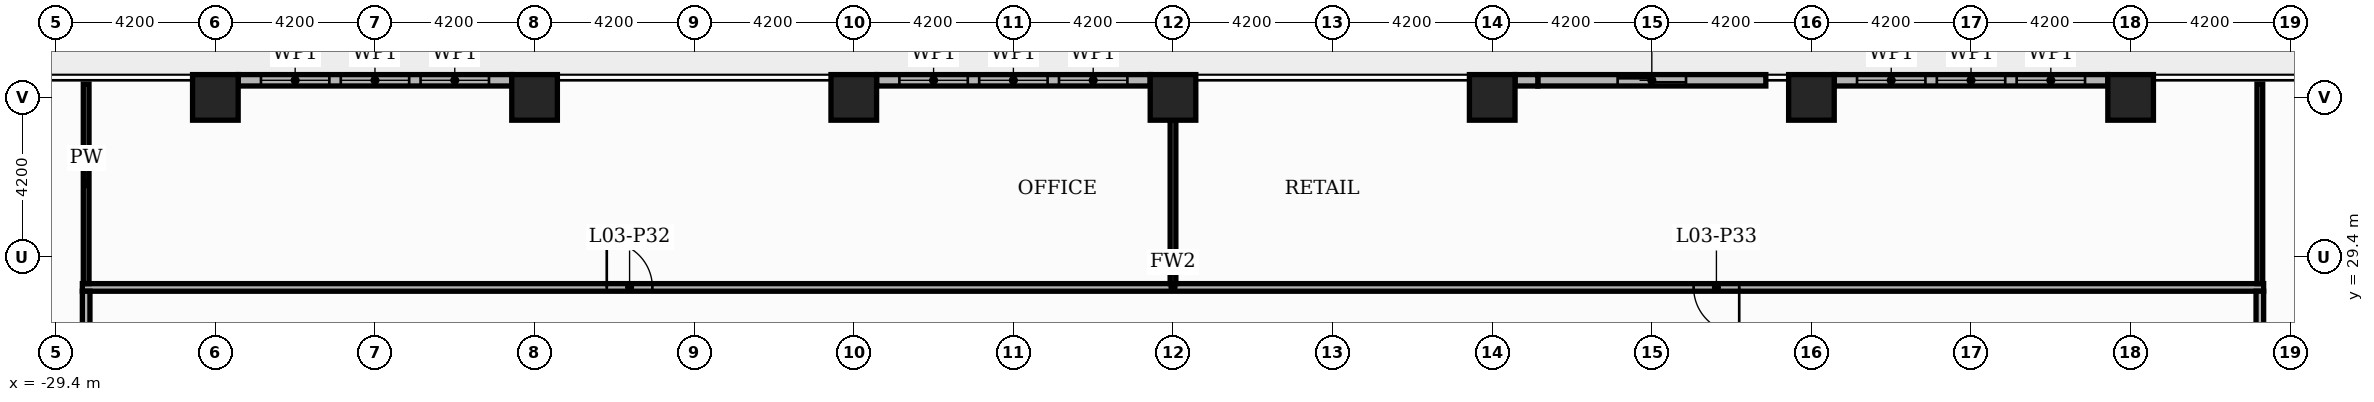
"""IFC4 building model, lengths in metres.
Left out: names, types, materials, properties, quantities, classifications, styles, units other than length and angle.
Written with IfcOpenShell. Run it as: python <this file> out.ifc"""

import sys

from ifc_helpers import new_model, si_unit, direction, frame, frame_2d, origin, origin_2d, place, context, subcontext, project, spatial, rectangle, extrude, element, fill, save


model = new_model("IFC4")
c1 = context("Model", 3, precision=1e-05, world=origin(), true_north=direction((0.0, 1.0)))
c2 = subcontext(c1, "Body", "Model", "MODEL_VIEW")
j1 = project(units=[si_unit("LENGTHUNIT", "METRE"), si_unit("PLANEANGLEUNIT", "RADIAN")], contexts=[c1])
p1 = place(None, origin())
s1 = spatial("IfcSite", under=j1, at=p1, CompositionType="ELEMENT")
p2 = place(p1, origin())
s2 = spatial("IfcBuilding", under=s1, at=p2, CompositionType="ELEMENT")
p3 = place(p2, frame((0.0, 0.0, 16.8)))
s3 = spatial("IfcBuildingStorey", under=s2, at=p3, CompositionType="ELEMENT", Elevation=16.8)
for number, where, z_axis, x_axis in (
    (1, (0.0, 33.6, 0.0), (0.0, 0.0, 1.0), (1.0, 0.0, 0.0)),
    (2, (8.4, 33.6, 0.0), (0.0, 0.0, 1.0), (1.0, 0.0, 0.0)),
    (3, (16.8, 33.6, 0.0), (0.0, 0.0, 1.0), (1.0, 0.0, 0.0)),
    (4, (25.2, 33.6, 0.0), (0.0, 0.0, 1.0), (1.0, 0.0, 0.0)),
    (5, (-8.4, 33.6, 0.0), (0.0, 0.0, 1.0), (1.0, 0.0, 0.0)),
    (6, (-16.8, 33.6, 0.0), (0.0, 0.0, 1.0), (1.0, 0.0, 0.0)),
    (7, (-25.2, 33.6, 0.0), (0.0, 0.0, 1.0), (1.0, 0.0, 0.0)),
):
    element("IfcColumn", number, at=place(p3, frame(where, z_axis=z_axis, x_axis=x_axis)), inside=s3, PredefinedType="COLUMN", context=c2, shape_type="SweptSolid", body=[
        extrude(rectangle(XDim=1.2, YDim=1.2, at=origin_2d()), origin(), (0.0, 0.0, 1.0), 5.4),
    ])
p4 = place(p3, frame((24.6, 34.05, 0.0), z_axis=(0.0, 0.0, 1.0), x_axis=(-1.0, 0.0, 0.0)))
e8 = element("IfcWall", 8, at=p4, inside=s3, PredefinedType="STANDARD", context=c2, shape_type="SweptSolid", body=[
    extrude(rectangle(XDim=7.2, YDim=0.3, at=frame_2d((3.6, 0.0))), origin(), (0.0, 0.0, 1.0), 4.98),
])
p5 = place(p4, frame((0.6, 0.0, 0.6)))
e9 = element("IfcOpeningElement", 9, at=p5, cuts=e8, PredefinedType="OPENING", context=c2, shape_type="SweptSolid", body=[
    extrude(rectangle(XDim=1.8, YDim=3.0, at=frame_2d((0.9, 1.5))), frame((0.0, 0.16, 0.0), z_axis=(0.0, -1.0, 0.0), x_axis=(1.0, 0.0, 0.0)), (0.0, 0.0, 1.0), 0.32),
])
p6 = place(p4, frame((2.7, 0.0, 0.6)))
e10 = element("IfcOpeningElement", 10, at=p6, cuts=e8, PredefinedType="OPENING", context=c2, shape_type="SweptSolid", body=[
    extrude(rectangle(XDim=1.8, YDim=3.0, at=frame_2d((0.9, 1.5))), frame((0.0, 0.16, 0.0), z_axis=(0.0, -1.0, 0.0), x_axis=(1.0, 0.0, 0.0)), (0.0, 0.0, 1.0), 0.32),
])
p7 = place(p4, frame((4.8, 0.0, 0.6)))
e11 = element("IfcOpeningElement", 11, at=p7, cuts=e8, PredefinedType="OPENING", context=c2, shape_type="SweptSolid", body=[
    extrude(rectangle(XDim=1.8, YDim=3.0, at=frame_2d((0.9, 1.5))), frame((0.0, 0.16, 0.0), z_axis=(0.0, -1.0, 0.0), x_axis=(1.0, 0.0, 0.0)), (0.0, 0.0, 1.0), 0.32),
])
p8 = place(p3, frame((15.6, 34.05, 0.0), z_axis=(0.0, 0.0, 1.0), x_axis=(-1.0, 0.0, 0.0)))
e12 = element("IfcWall", 12, at=p8, inside=s3, PredefinedType="STANDARD", context=c2, shape_type="SweptSolid", body=[
    extrude(rectangle(XDim=6.0, YDim=0.3, at=frame_2d((3.0, 0.0))), origin(), (0.0, 0.0, 1.0), 4.98),
])
p9 = place(p8, frame((2.1, 0.0, 0.0)))
e13 = element("IfcOpeningElement", 13, at=p9, cuts=e12, PredefinedType="OPENING", context=c2, shape_type="SweptSolid", body=[
    extrude(rectangle(XDim=1.8, YDim=2.4, at=frame_2d((0.9, 1.2))), frame((0.0, 0.16, 0.0), z_axis=(0.0, -1.0, 0.0), x_axis=(1.0, 0.0, 0.0)), (0.0, 0.0, 1.0), 0.32),
])
p10 = place(p3, frame((9.6, 34.05, 0.0), z_axis=(0.0, 0.0, 1.0), x_axis=(-1.0, 0.0, 0.0)))
e14 = element("IfcWall", 14, at=p10, inside=s3, PredefinedType="STANDARD", context=c2, shape_type="SweptSolid", body=[
    extrude(rectangle(XDim=0.6, YDim=0.3, at=frame_2d((0.3, 0.0))), origin(), (0.0, 0.0, 1.0), 4.98),
])
p11 = place(p3, frame((-0.6, 34.05, 0.0), z_axis=(0.0, 0.0, 1.0), x_axis=(-1.0, 0.0, 0.0)))
e15 = element("IfcWall", 15, at=p11, inside=s3, PredefinedType="STANDARD", context=c2, shape_type="SweptSolid", body=[
    extrude(rectangle(XDim=7.2, YDim=0.3, at=frame_2d((3.6, 0.0))), origin(), (0.0, 0.0, 1.0), 4.98),
])
p12 = place(p11, frame((0.6, 0.0, 0.6)))
e16 = element("IfcOpeningElement", 16, at=p12, cuts=e15, PredefinedType="OPENING", context=c2, shape_type="SweptSolid", body=[
    extrude(rectangle(XDim=1.8, YDim=3.0, at=frame_2d((0.9, 1.5))), frame((0.0, 0.16, 0.0), z_axis=(0.0, -1.0, 0.0), x_axis=(1.0, 0.0, 0.0)), (0.0, 0.0, 1.0), 0.32),
])
p13 = place(p11, frame((2.7, 0.0, 0.6)))
e17 = element("IfcOpeningElement", 17, at=p13, cuts=e15, PredefinedType="OPENING", context=c2, shape_type="SweptSolid", body=[
    extrude(rectangle(XDim=1.8, YDim=3.0, at=frame_2d((0.9, 1.5))), frame((0.0, 0.16, 0.0), z_axis=(0.0, -1.0, 0.0), x_axis=(1.0, 0.0, 0.0)), (0.0, 0.0, 1.0), 0.32),
])
p14 = place(p11, frame((4.8, 0.0, 0.6)))
e18 = element("IfcOpeningElement", 18, at=p14, cuts=e15, PredefinedType="OPENING", context=c2, shape_type="SweptSolid", body=[
    extrude(rectangle(XDim=1.8, YDim=3.0, at=frame_2d((0.9, 1.5))), frame((0.0, 0.16, 0.0), z_axis=(0.0, -1.0, 0.0), x_axis=(1.0, 0.0, 0.0)), (0.0, 0.0, 1.0), 0.32),
])
p15 = place(p3, frame((-17.4, 34.05, 0.0), z_axis=(0.0, 0.0, 1.0), x_axis=(-1.0, 0.0, 0.0)))
e19 = element("IfcWall", 19, at=p15, inside=s3, PredefinedType="STANDARD", context=c2, shape_type="SweptSolid", body=[
    extrude(rectangle(XDim=7.2, YDim=0.3, at=frame_2d((3.6, 0.0))), origin(), (0.0, 0.0, 1.0), 4.98),
])
p16 = place(p15, frame((0.6, 0.0, 0.6)))
e20 = element("IfcOpeningElement", 20, at=p16, cuts=e19, PredefinedType="OPENING", context=c2, shape_type="SweptSolid", body=[
    extrude(rectangle(XDim=1.8, YDim=3.0, at=frame_2d((0.9, 1.5))), frame((0.0, 0.16, 0.0), z_axis=(0.0, -1.0, 0.0), x_axis=(1.0, 0.0, 0.0)), (0.0, 0.0, 1.0), 0.32),
])
p17 = place(p15, frame((2.7, 0.0, 0.6)))
e21 = element("IfcOpeningElement", 21, at=p17, cuts=e19, PredefinedType="OPENING", context=c2, shape_type="SweptSolid", body=[
    extrude(rectangle(XDim=1.8, YDim=3.0, at=frame_2d((0.9, 1.5))), frame((0.0, 0.16, 0.0), z_axis=(0.0, -1.0, 0.0), x_axis=(1.0, 0.0, 0.0)), (0.0, 0.0, 1.0), 0.32),
])
p18 = place(p15, frame((4.8, 0.0, 0.6)))
e22 = element("IfcOpeningElement", 22, at=p18, cuts=e19, PredefinedType="OPENING", context=c2, shape_type="SweptSolid", body=[
    extrude(rectangle(XDim=1.8, YDim=3.0, at=frame_2d((0.9, 1.5))), frame((0.0, 0.16, 0.0), z_axis=(0.0, -1.0, 0.0), x_axis=(1.0, 0.0, 0.0)), (0.0, 0.0, 1.0), 0.32),
])
p19 = place(p3, frame((-28.7, 28.6, 0.0), z_axis=(0.0, 0.0, 1.0), x_axis=(1.0, 0.0, 0.0)))
e23 = element("IfcWall", 23, at=p19, inside=s3, PredefinedType="PARTITIONING", context=c2, shape_type="SweptSolid", body=[
    extrude(rectangle(XDim=57.4, YDim=0.2, at=frame_2d((28.7, 0.0))), origin(), (0.0, 0.0, 1.0), 4.68),
])
p20 = place(p19, frame((13.8, 0.0, 0.0)))
e24 = element("IfcOpeningElement", 24, at=p20, cuts=e23, PredefinedType="OPENING", context=c2, shape_type="SweptSolid", body=[
    extrude(rectangle(XDim=1.2, YDim=2.2, at=frame_2d((0.6, 1.1))), frame((0.0, 0.11, 0.0), z_axis=(0.0, -1.0, 0.0), x_axis=(1.0, 0.0, 0.0)), (0.0, 0.0, 1.0), 0.22),
])
p21 = place(p19, frame((42.4, 0.0, 0.0)))
e25 = element("IfcOpeningElement", 25, at=p21, cuts=e23, PredefinedType="OPENING", context=c2, shape_type="SweptSolid", body=[
    extrude(rectangle(XDim=1.2, YDim=2.2, at=frame_2d((0.6, 1.1))), frame((0.0, 0.11, 0.0), z_axis=(0.0, -1.0, 0.0), x_axis=(1.0, 0.0, 0.0)), (0.0, 0.0, 1.0), 0.22),
])
p22 = place(p3, frame((-28.6, -28.5, 0.0), z_axis=(0.0, 0.0, 1.0), x_axis=(0.0, 1.0, 0.0)))
e26 = element("IfcWall", 26, at=p22, inside=s3, PredefinedType="PARTITIONING", context=c2, shape_type="SweptSolid", body=[
    extrude(rectangle(XDim=57.0, YDim=0.2, at=frame_2d((28.5, 0.0))), origin(), (0.0, 0.0, 1.0), 4.78),
])
p23 = place(p22, frame((9.4, 0.0, 0.0)))
e27 = element("IfcOpeningElement", 27, at=p23, cuts=e26, PredefinedType="OPENING", context=c2, shape_type="SweptSolid", body=[
    extrude(rectangle(XDim=1.2, YDim=2.2, at=frame_2d((0.6, 1.1))), frame((0.0, 0.11, 0.0), z_axis=(0.0, -1.0, 0.0), x_axis=(1.0, 0.0, 0.0)), (0.0, 0.0, 1.0), 0.22),
])
p24 = place(p22, frame((27.9, 0.0, 0.0)))
e28 = element("IfcOpeningElement", 28, at=p24, cuts=e26, PredefinedType="OPENING", context=c2, shape_type="SweptSolid", body=[
    extrude(rectangle(XDim=1.2, YDim=2.2, at=frame_2d((0.6, 1.1))), frame((0.0, 0.11, 0.0), z_axis=(0.0, -1.0, 0.0), x_axis=(1.0, 0.0, 0.0)), (0.0, 0.0, 1.0), 0.22),
])
p25 = place(p22, frame((46.4, 0.0, 0.0)))
e29 = element("IfcOpeningElement", 29, at=p25, cuts=e26, PredefinedType="OPENING", context=c2, shape_type="SweptSolid", body=[
    extrude(rectangle(XDim=1.2, YDim=2.2, at=frame_2d((0.6, 1.1))), frame((0.0, 0.11, 0.0), z_axis=(0.0, -1.0, 0.0), x_axis=(1.0, 0.0, 0.0)), (0.0, 0.0, 1.0), 0.22),
])
p26 = place(p3, frame((-28.6, 28.7, 0.0), z_axis=(0.0, 0.0, 1.0), x_axis=(0.0, 1.0, 0.0)))
e30 = element("IfcWall", 30, at=p26, inside=s3, PredefinedType="PARTITIONING", context=c2, shape_type="SweptSolid", body=[
    extrude(rectangle(XDim=5.25, YDim=0.15, at=frame_2d((2.625, 0.0))), origin(), (0.0, 0.0, 1.0), 4.78),
])
p27 = place(p3, frame((0.0, 28.7, 0.0), z_axis=(0.0, 0.0, 1.0), x_axis=(0.0, 1.0, 0.0)))
e31 = element("IfcWall", 31, at=p27, inside=s3, PredefinedType="PARTITIONING", context=c2, shape_type="SweptSolid", body=[
    extrude(rectangle(XDim=4.3, YDim=0.15, at=frame_2d((2.15, 0.0))), origin(), (0.0, 0.0, 1.0), 4.68),
])
p28 = place(p3, frame((28.6, -28.5, 0.0), z_axis=(0.0, 0.0, 1.0), x_axis=(0.0, 1.0, 0.0)))
e32 = element("IfcWall", 32, at=p28, inside=s3, PredefinedType="PARTITIONING", context=c2, shape_type="SweptSolid", body=[
    extrude(rectangle(XDim=57.0, YDim=0.2, at=frame_2d((28.5, 0.0))), origin(), (0.0, 0.0, 1.0), 4.78),
])
p29 = place(p28, frame((5.2, 0.0, 0.0)))
e33 = element("IfcOpeningElement", 33, at=p29, cuts=e32, PredefinedType="OPENING", context=c2, shape_type="SweptSolid", body=[
    extrude(rectangle(XDim=1.2, YDim=2.2, at=frame_2d((0.6, 1.1))), frame((0.0, 0.11, 0.0), z_axis=(0.0, -1.0, 0.0), x_axis=(1.0, 0.0, 0.0)), (0.0, 0.0, 1.0), 0.22),
])
p30 = place(p28, frame((15.3, 0.0, 0.0)))
e34 = element("IfcOpeningElement", 34, at=p30, cuts=e32, PredefinedType="OPENING", context=c2, shape_type="SweptSolid", body=[
    extrude(rectangle(XDim=1.2, YDim=2.2, at=frame_2d((0.6, 1.1))), frame((0.0, 0.11, 0.0), z_axis=(0.0, -1.0, 0.0), x_axis=(1.0, 0.0, 0.0)), (0.0, 0.0, 1.0), 0.22),
])
p31 = place(p28, frame((27.9, 0.0, 0.0)))
e35 = element("IfcOpeningElement", 35, at=p31, cuts=e32, PredefinedType="OPENING", context=c2, shape_type="SweptSolid", body=[
    extrude(rectangle(XDim=1.2, YDim=2.2, at=frame_2d((0.6, 1.1))), frame((0.0, 0.11, 0.0), z_axis=(0.0, -1.0, 0.0), x_axis=(1.0, 0.0, 0.0)), (0.0, 0.0, 1.0), 0.22),
])
p32 = place(p28, frame((40.5, 0.0, 0.0)))
e36 = element("IfcOpeningElement", 36, at=p32, cuts=e32, PredefinedType="OPENING", context=c2, shape_type="SweptSolid", body=[
    extrude(rectangle(XDim=1.2, YDim=2.2, at=frame_2d((0.6, 1.1))), frame((0.0, 0.11, 0.0), z_axis=(0.0, -1.0, 0.0), x_axis=(1.0, 0.0, 0.0)), (0.0, 0.0, 1.0), 0.22),
])
p33 = place(p28, frame((50.6, 0.0, 0.0)))
e37 = element("IfcOpeningElement", 37, at=p33, cuts=e32, PredefinedType="OPENING", context=c2, shape_type="SweptSolid", body=[
    extrude(rectangle(XDim=1.2, YDim=2.2, at=frame_2d((0.6, 1.1))), frame((0.0, 0.11, 0.0), z_axis=(0.0, -1.0, 0.0), x_axis=(1.0, 0.0, 0.0)), (0.0, 0.0, 1.0), 0.22),
])
p34 = place(p3, frame((28.6, 28.7, 0.0), z_axis=(0.0, 0.0, 1.0), x_axis=(0.0, 1.0, 0.0)))
e38 = element("IfcWall", 38, at=p34, inside=s3, PredefinedType="PARTITIONING", context=c2, shape_type="SweptSolid", body=[
    extrude(rectangle(XDim=5.25, YDim=0.15, at=frame_2d((2.625, 0.0))), origin(), (0.0, 0.0, 1.0), 4.78),
])
p35 = place(p5, origin())
e39 = element("IfcWindow", 39, at=p35, inside=s3, PartitioningType="SINGLE_PANEL", PredefinedType="WINDOW", context=c2, shape_type="SweptSolid", body=[
    extrude(rectangle(XDim=1.8, YDim=3.0, at=frame_2d((0.9, 1.5))), frame((0.0, 0.03, 0.0), z_axis=(0.0, -1.0, 0.0), x_axis=(1.0, 0.0, 0.0)), (0.0, 0.0, 1.0), 0.06),
])
fill(e9, e39)
p36 = place(p6, origin())
e40 = element("IfcWindow", 40, at=p36, inside=s3, PartitioningType="SINGLE_PANEL", PredefinedType="WINDOW", context=c2, shape_type="SweptSolid", body=[
    extrude(rectangle(XDim=1.8, YDim=3.0, at=frame_2d((0.9, 1.5))), frame((0.0, 0.03, 0.0), z_axis=(0.0, -1.0, 0.0), x_axis=(1.0, 0.0, 0.0)), (0.0, 0.0, 1.0), 0.06),
])
fill(e10, e40)
p37 = place(p7, origin())
e41 = element("IfcWindow", 41, at=p37, inside=s3, PartitioningType="SINGLE_PANEL", PredefinedType="WINDOW", context=c2, shape_type="SweptSolid", body=[
    extrude(rectangle(XDim=1.8, YDim=3.0, at=frame_2d((0.9, 1.5))), frame((0.0, 0.03, 0.0), z_axis=(0.0, -1.0, 0.0), x_axis=(1.0, 0.0, 0.0)), (0.0, 0.0, 1.0), 0.06),
])
fill(e11, e41)
p38 = place(p9, origin())
e42 = element("IfcDoor", 42, at=p38, inside=s3, OperationType="SLIDING_TO_RIGHT", PredefinedType="DOOR", context=c2, shape_type="SweptSolid", body=[
    extrude(rectangle(XDim=1.8, YDim=2.4, at=frame_2d((0.9, 1.2))), frame((0.0, 0.025, 0.0), z_axis=(0.0, -1.0, 0.0), x_axis=(1.0, 0.0, 0.0)), (0.0, 0.0, 1.0), 0.05),
])
fill(e13, e42)
p39 = place(p12, origin())
e43 = element("IfcWindow", 43, at=p39, inside=s3, PartitioningType="SINGLE_PANEL", PredefinedType="WINDOW", context=c2, shape_type="SweptSolid", body=[
    extrude(rectangle(XDim=1.8, YDim=3.0, at=frame_2d((0.9, 1.5))), frame((0.0, 0.03, 0.0), z_axis=(0.0, -1.0, 0.0), x_axis=(1.0, 0.0, 0.0)), (0.0, 0.0, 1.0), 0.06),
])
fill(e16, e43)
p40 = place(p13, origin())
e44 = element("IfcWindow", 44, at=p40, inside=s3, PartitioningType="SINGLE_PANEL", PredefinedType="WINDOW", context=c2, shape_type="SweptSolid", body=[
    extrude(rectangle(XDim=1.8, YDim=3.0, at=frame_2d((0.9, 1.5))), frame((0.0, 0.03, 0.0), z_axis=(0.0, -1.0, 0.0), x_axis=(1.0, 0.0, 0.0)), (0.0, 0.0, 1.0), 0.06),
])
fill(e17, e44)
p41 = place(p14, origin())
e45 = element("IfcWindow", 45, at=p41, inside=s3, PartitioningType="SINGLE_PANEL", PredefinedType="WINDOW", context=c2, shape_type="SweptSolid", body=[
    extrude(rectangle(XDim=1.8, YDim=3.0, at=frame_2d((0.9, 1.5))), frame((0.0, 0.03, 0.0), z_axis=(0.0, -1.0, 0.0), x_axis=(1.0, 0.0, 0.0)), (0.0, 0.0, 1.0), 0.06),
])
fill(e18, e45)
p42 = place(p16, origin())
e46 = element("IfcWindow", 46, at=p42, inside=s3, PartitioningType="SINGLE_PANEL", PredefinedType="WINDOW", context=c2, shape_type="SweptSolid", body=[
    extrude(rectangle(XDim=1.8, YDim=3.0, at=frame_2d((0.9, 1.5))), frame((0.0, 0.03, 0.0), z_axis=(0.0, -1.0, 0.0), x_axis=(1.0, 0.0, 0.0)), (0.0, 0.0, 1.0), 0.06),
])
fill(e20, e46)
p43 = place(p17, origin())
e47 = element("IfcWindow", 47, at=p43, inside=s3, PartitioningType="SINGLE_PANEL", PredefinedType="WINDOW", context=c2, shape_type="SweptSolid", body=[
    extrude(rectangle(XDim=1.8, YDim=3.0, at=frame_2d((0.9, 1.5))), frame((0.0, 0.03, 0.0), z_axis=(0.0, -1.0, 0.0), x_axis=(1.0, 0.0, 0.0)), (0.0, 0.0, 1.0), 0.06),
])
fill(e21, e47)
p44 = place(p18, origin())
e48 = element("IfcWindow", 48, at=p44, inside=s3, PartitioningType="SINGLE_PANEL", PredefinedType="WINDOW", context=c2, shape_type="SweptSolid", body=[
    extrude(rectangle(XDim=1.8, YDim=3.0, at=frame_2d((0.9, 1.5))), frame((0.0, 0.03, 0.0), z_axis=(0.0, -1.0, 0.0), x_axis=(1.0, 0.0, 0.0)), (0.0, 0.0, 1.0), 0.06),
])
fill(e22, e48)
p45 = place(p20, origin())
e49 = element("IfcDoor", 49, at=p45, inside=s3, OperationType="SINGLE_SWING_LEFT", PredefinedType="DOOR", context=c2, shape_type="SweptSolid", body=[
    extrude(rectangle(XDim=1.2, YDim=2.2, at=frame_2d((0.6, 1.1))), frame((0.0, 0.025, 0.0), z_axis=(0.0, -1.0, 0.0), x_axis=(1.0, 0.0, 0.0)), (0.0, 0.0, 1.0), 0.05),
])
fill(e24, e49)
p46 = place(p21, origin())
e50 = element("IfcDoor", 50, at=p46, inside=s3, OperationType="SINGLE_SWING_RIGHT", PredefinedType="DOOR", context=c2, shape_type="SweptSolid", body=[
    extrude(rectangle(XDim=1.2, YDim=2.2, at=frame_2d((0.6, 1.1))), frame((0.0, 0.025, 0.0), z_axis=(0.0, -1.0, 0.0), x_axis=(1.0, 0.0, 0.0)), (0.0, 0.0, 1.0), 0.05),
])
fill(e25, e50)
save(model, sys.argv[1])
